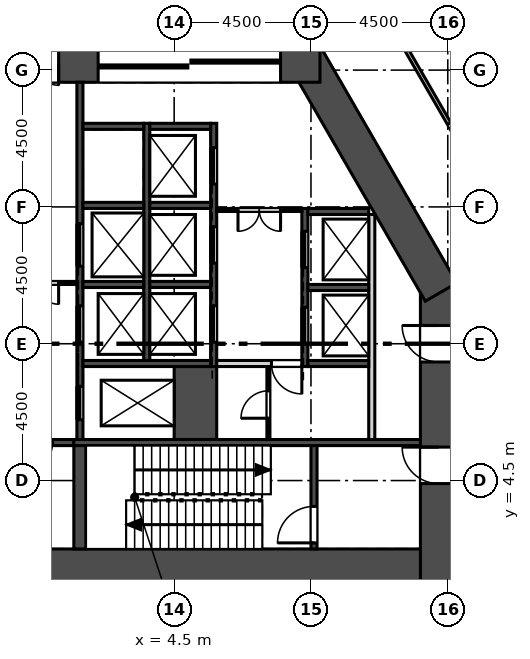
"""IFC4 building model, lengths in metres.
Left out: names, types, materials, properties, quantities, classifications, styles, units other than length and angle.
Written with IfcOpenShell. Run it as: python <this file> out.ifc"""

import sys

from ifc_helpers import new_model, si_unit, direction, frame, frame_2d, origin, place, context, subcontext, project, spatial, rectangle, extrude, element, fill, save


model = new_model("IFC4")
c1 = context("Model", 3, precision=1e-05, world=origin(), true_north=direction((0.0, 1.0)))
c2 = subcontext(c1, "Body", "Model", "MODEL_VIEW")
j1 = project(units=[si_unit("LENGTHUNIT", "METRE"), si_unit("PLANEANGLEUNIT", "RADIAN")], contexts=[c1])
p1 = place(None, origin())
s1 = spatial("IfcSite", under=j1, at=p1, CompositionType="ELEMENT")
p2 = place(p1, origin())
s2 = spatial("IfcBuilding", under=s1, at=p2, CompositionType="ELEMENT")
p3 = place(p2, frame((0.0, 0.0, 137.5)))
s3 = spatial("IfcBuildingStorey", under=s2, at=p3, CompositionType="ELEMENT", Elevation=137.5)
p4 = place(p3, frame((-13.8, 1.65, 0.0), z_axis=(0.0, 0.0, 1.0), x_axis=(1.0, 0.0, 0.0)))
e1 = element("IfcWall", 1, at=p4, inside=s3, PredefinedType="SHEAR", context=c2, shape_type="SweptSolid", body=[
    extrude(rectangle(XDim=27.6, YDim=1.2, at=frame_2d((13.8, 0.0))), origin(), (0.0, 0.0, 1.0), 5.4),
])
p5 = place(p3, frame((13.2, 1.05, 0.0), z_axis=(0.0, 0.0, 1.0), x_axis=(0.0, 1.0, 0.0)))
e2 = element("IfcWall", 2, at=p5, inside=s3, PredefinedType="SHEAR", context=c2, shape_type="SweptSolid", body=[
    extrude(rectangle(XDim=9.949, YDim=1.2, at=frame_2d((4.975, 0.0))), origin(), (0.0, 0.0, 1.0), 5.4),
])
p6 = place(p5, frame((3.35, 0.0, 0.0)))
e3 = element("IfcOpeningElement", 3, at=p6, cuts=e2, PredefinedType="OPENING", context=c2, shape_type="SweptSolid", body=[
    extrude(rectangle(XDim=1.2, YDim=2.1, at=frame_2d((0.6, 1.05))), frame((0.0, 0.61, 0.0), z_axis=(0.0, -1.0, 0.0), x_axis=(1.0, 0.0, 0.0)), (0.0, 0.0, 1.0), 1.22),
])
p7 = place(p5, frame((7.35, 0.0, 0.0)))
e4 = element("IfcOpeningElement", 4, at=p7, cuts=e2, PredefinedType="OPENING", context=c2, shape_type="SweptSolid", body=[
    extrude(rectangle(XDim=1.2, YDim=2.1, at=frame_2d((0.6, 1.05))), frame((0.0, 0.61, 0.0), z_axis=(0.0, -1.0, 0.0), x_axis=(1.0, 0.0, 0.0)), (0.0, 0.0, 1.0), 1.22),
])
p8 = place(p3, frame((13.281, 10.699, 0.0), z_axis=(0.0, 0.0, 1.0), x_axis=(-0.499998513025, 0.866026262288, 0.0)))
e5 = element("IfcWall", 5, at=p8, inside=s3, PredefinedType="SHEAR", context=c2, shape_type="SweptSolid", body=[
    extrude(rectangle(XDim=9.008, YDim=1.2, at=frame_2d((4.504, 0.0))), origin(), (0.0, 0.0, 1.0), 5.4),
])
p9 = place(p3, frame((9.296, 18.2, 0.0), z_axis=(0.0, 0.0, 1.0), x_axis=(-1.0, 0.0, 0.0)))
e6 = element("IfcWall", 6, at=p9, inside=s3, PredefinedType="SHEAR", context=c2, shape_type="SweptSolid", body=[
    extrude(rectangle(XDim=18.592, YDim=1.2, at=frame_2d((9.296, 0.0))), origin(), (0.0, 0.0, 1.0), 5.4),
])
p10 = place(p9, frame((8.596, 0.0, 0.0)))
e7 = element("IfcOpeningElement", 7, at=p10, cuts=e6, PredefinedType="OPENING", context=c2, shape_type="SweptSolid", body=[
    extrude(rectangle(XDim=1.4, YDim=2.1, at=frame_2d((0.7, 1.05))), frame((0.0, 0.61, 0.0), z_axis=(0.0, -1.0, 0.0), x_axis=(1.0, 0.0, 0.0)), (0.0, 0.0, 1.0), 1.22),
])
p11 = place(p9, frame((11.296, 0.0, 0.0)))
e8 = element("IfcOpeningElement", 8, at=p11, cuts=e6, PredefinedType="OPENING", context=c2, shape_type="SweptSolid", body=[
    extrude(rectangle(XDim=6.0, YDim=2.4, at=frame_2d((3.0, 1.2))), frame((0.0, 0.61, 0.0), z_axis=(0.0, -1.0, 0.0), x_axis=(1.0, 0.0, 0.0)), (0.0, 0.0, 1.0), 1.22),
])
p12 = place(p9, frame((1.296, 0.0, 0.0)))
e9 = element("IfcOpeningElement", 9, at=p12, cuts=e6, PredefinedType="OPENING", context=c2, shape_type="SweptSolid", body=[
    extrude(rectangle(XDim=6.0, YDim=2.4, at=frame_2d((3.0, 1.2))), frame((0.0, 0.61, 0.0), z_axis=(0.0, -1.0, 0.0), x_axis=(1.0, 0.0, 0.0)), (0.0, 0.0, 1.0), 1.22),
])
p13 = place(p3, frame((11.0, 5.85, 0.0), z_axis=(0.0, 0.0, 1.0), x_axis=(0.0, 1.0, 0.0)))
e10 = element("IfcWall", 10, at=p13, inside=s3, PredefinedType="SOLIDWALL", context=c2, shape_type="SweptSolid", body=[
    extrude(rectangle(XDim=7.4, YDim=0.2, at=frame_2d((3.7, 0.0))), origin(), (0.0, 0.0, 1.0), 5.0),
])
p14 = place(p3, frame((8.8, 8.25, -0.4), z_axis=(0.0, 0.0, 1.0), x_axis=(0.0, 1.0, 0.0)))
e11 = element("IfcWall", 11, at=p14, inside=s3, PredefinedType="SOLIDWALL", context=c2, shape_type="SweptSolid", body=[
    extrude(rectangle(XDim=5.2, YDim=0.2, at=frame_2d((2.6, 0.0))), origin(), (0.0, 0.0, 1.0), 5.4),
])
p15 = place(p14, frame((0.75, 0.0, 0.4)))
e12 = element("IfcOpeningElement", 12, at=p15, cuts=e11, PredefinedType="OPENING", context=c2, shape_type="SweptSolid", body=[
    extrude(rectangle(XDim=1.2, YDim=2.1, at=frame_2d((0.6, 1.05))), frame((0.0, 0.11, 0.0), z_axis=(0.0, -1.0, 0.0), x_axis=(1.0, 0.0, 0.0)), (0.0, 0.0, 1.0), 0.22),
])
p16 = place(p14, frame((3.25, 0.0, 0.4)))
e13 = element("IfcOpeningElement", 13, at=p16, cuts=e11, PredefinedType="OPENING", context=c2, shape_type="SweptSolid", body=[
    extrude(rectangle(XDim=1.2, YDim=2.1, at=frame_2d((0.6, 1.05))), frame((0.0, 0.11, 0.0), z_axis=(0.0, -1.0, 0.0), x_axis=(1.0, 0.0, 0.0)), (0.0, 0.0, 1.0), 0.22),
])
p17 = place(p3, frame((5.8, 8.25, -0.4), z_axis=(0.0, 0.0, 1.0), x_axis=(0.0, 1.0, 0.0)))
e14 = element("IfcWall", 14, at=p17, inside=s3, PredefinedType="SOLIDWALL", context=c2, shape_type="SweptSolid", body=[
    extrude(rectangle(XDim=8.0, YDim=0.2, at=frame_2d((4.0, 0.0))), origin(), (0.0, 0.0, 1.0), 5.4),
])
p18 = place(p17, frame((0.8, 0.0, 0.4)))
e15 = element("IfcOpeningElement", 15, at=p18, cuts=e14, PredefinedType="OPENING", context=c2, shape_type="SweptSolid", body=[
    extrude(rectangle(XDim=1.2, YDim=2.1, at=frame_2d((0.6, 1.05))), frame((0.0, 0.11, 0.0), z_axis=(0.0, -1.0, 0.0), x_axis=(1.0, 0.0, 0.0)), (0.0, 0.0, 1.0), 0.22),
])
p19 = place(p17, frame((3.4, 0.0, 0.4)))
e16 = element("IfcOpeningElement", 16, at=p19, cuts=e14, PredefinedType="OPENING", context=c2, shape_type="SweptSolid", body=[
    extrude(rectangle(XDim=1.2, YDim=2.1, at=frame_2d((0.6, 1.05))), frame((0.0, 0.11, 0.0), z_axis=(0.0, -1.0, 0.0), x_axis=(1.0, 0.0, 0.0)), (0.0, 0.0, 1.0), 0.22),
])
p20 = place(p17, frame((6.0, 0.0, 0.4)))
e17 = element("IfcOpeningElement", 17, at=p20, cuts=e14, PredefinedType="OPENING", context=c2, shape_type="SweptSolid", body=[
    extrude(rectangle(XDim=1.2, YDim=2.1, at=frame_2d((0.6, 1.05))), frame((0.0, 0.11, 0.0), z_axis=(0.0, -1.0, 0.0), x_axis=(1.0, 0.0, 0.0)), (0.0, 0.0, 1.0), 0.22),
])
p21 = place(p3, frame((3.6, 8.45, -0.4), z_axis=(0.0, 0.0, 1.0), x_axis=(0.0, 1.0, 0.0)))
e18 = element("IfcWall", 18, at=p21, inside=s3, PredefinedType="SOLIDWALL", context=c2, shape_type="SweptSolid", body=[
    extrude(rectangle(XDim=7.8, YDim=0.2, at=frame_2d((3.9, 0.0))), origin(), (0.0, 0.0, 1.0), 5.4),
])
p22 = place(p3, frame((1.4, 5.85, -0.4), z_axis=(0.0, 0.0, 1.0), x_axis=(0.0, 1.0, 0.0)))
e19 = element("IfcWall", 19, at=p22, inside=s3, PredefinedType="SOLIDWALL", context=c2, shape_type="SweptSolid", body=[
    extrude(rectangle(XDim=11.75, YDim=0.2, at=frame_2d((5.875, 0.0))), origin(), (0.0, 0.0, 1.0), 5.4),
])
p23 = place(p22, frame((3.2, 0.0, 0.4)))
e20 = element("IfcOpeningElement", 20, at=p23, cuts=e19, PredefinedType="OPENING", context=c2, shape_type="SweptSolid", body=[
    extrude(rectangle(XDim=1.2, YDim=2.1, at=frame_2d((0.6, 1.05))), frame((0.0, 0.11, 0.0), z_axis=(0.0, -1.0, 0.0), x_axis=(1.0, 0.0, 0.0)), (0.0, 0.0, 1.0), 0.22),
])
p24 = place(p22, frame((5.7, 0.0, 0.4)))
e21 = element("IfcOpeningElement", 21, at=p24, cuts=e19, PredefinedType="OPENING", context=c2, shape_type="SweptSolid", body=[
    extrude(rectangle(XDim=1.4, YDim=2.1, at=frame_2d((0.7, 1.05))), frame((0.0, 0.11, 0.0), z_axis=(0.0, -1.0, 0.0), x_axis=(1.0, 0.0, 0.0)), (0.0, 0.0, 1.0), 0.22),
])
p25 = place(p22, frame((0.65, 0.0, 0.4)))
e22 = element("IfcOpeningElement", 22, at=p25, cuts=e19, PredefinedType="OPENING", context=c2, shape_type="SweptSolid", body=[
    extrude(rectangle(XDim=1.1, YDim=2.1, at=frame_2d((0.55, 1.05))), frame((0.0, 0.11, 0.0), z_axis=(0.0, -1.0, 0.0), x_axis=(1.0, 0.0, 0.0)), (0.0, 0.0, 1.0), 0.22),
])
p26 = place(p3, frame((5.2, 5.85, -0.4), z_axis=(0.0, 0.0, 1.0), x_axis=(0.0, 1.0, 0.0)))
e23 = element("IfcWall", 23, at=p26, inside=s3, PredefinedType="SOLIDWALL", context=c2, shape_type="SweptSolid", body=[
    extrude(rectangle(XDim=2.4, YDim=1.4, at=frame_2d((1.2, 0.0))), origin(), (0.0, 0.0, 1.0), 5.4),
])
p27 = place(p3, frame((8.9, 8.35, -0.4), z_axis=(0.0, 0.0, 1.0), x_axis=(1.0, 0.0, 0.0)))
e24 = element("IfcWall", 24, at=p27, inside=s3, PredefinedType="SOLIDWALL", context=c2, shape_type="SweptSolid", body=[
    extrude(rectangle(XDim=2.0, YDim=0.2, at=frame_2d((1.0, 0.0))), origin(), (0.0, 0.0, 1.0), 5.4),
])
p28 = place(p3, frame((1.5, 8.35, -0.4), z_axis=(0.0, 0.0, 1.0), x_axis=(1.0, 0.0, 0.0)))
e25 = element("IfcWall", 25, at=p28, inside=s3, PredefinedType="SOLIDWALL", context=c2, shape_type="SweptSolid", body=[
    extrude(rectangle(XDim=4.2, YDim=0.2, at=frame_2d((2.1, 0.0))), origin(), (0.0, 0.0, 1.0), 5.4),
])
p29 = place(p3, frame((-1.2, 5.75, -0.4), z_axis=(0.0, 0.0, 1.0), x_axis=(1.0, 0.0, 0.0)))
e26 = element("IfcWall", 26, at=p29, inside=s3, PredefinedType="SOLIDWALL", context=c2, shape_type="SweptSolid", body=[
    extrude(rectangle(XDim=2.4, YDim=0.2, at=frame_2d((1.2, 0.0))), origin(), (0.0, 0.0, 1.0), 5.4),
])
p30 = place(p29, frame((0.7, 0.0, 0.4)))
e27 = element("IfcOpeningElement", 27, at=p30, cuts=e26, PredefinedType="OPENING", context=c2, shape_type="SweptSolid", body=[
    extrude(rectangle(XDim=1.0, YDim=2.1, at=frame_2d((0.5, 1.05))), frame((0.0, 0.11, 0.0), z_axis=(0.0, -1.0, 0.0), x_axis=(1.0, 0.0, 0.0)), (0.0, 0.0, 1.0), 0.22),
])
p31 = place(p3, frame((1.2, 5.75, -0.4), z_axis=(0.0, 0.0, 1.0), x_axis=(1.0, 0.0, 0.0)))
e28 = element("IfcWall", 28, at=p31, inside=s3, PredefinedType="SOLIDWALL", context=c2, shape_type="SweptSolid", body=[
    extrude(rectangle(XDim=11.4, YDim=0.2, at=frame_2d((5.7, 0.0))), origin(), (0.0, 0.0, 1.0), 5.4),
])
p32 = place(p3, frame((9.1, 2.25, -0.4), z_axis=(0.0, 0.0, 1.0), x_axis=(0.0, 1.0, 0.0)))
e29 = element("IfcWall", 29, at=p32, inside=s3, PredefinedType="SOLIDWALL", context=c2, shape_type="SweptSolid", body=[
    extrude(rectangle(XDim=3.4, YDim=0.2, at=frame_2d((1.7, 0.0))), origin(), (0.0, 0.0, 1.0), 5.4),
])
p33 = place(p32, frame((0.2, 0.0, 0.4)))
e30 = element("IfcOpeningElement", 30, at=p33, cuts=e29, PredefinedType="OPENING", context=c2, shape_type="SweptSolid", body=[
    extrude(rectangle(XDim=1.2, YDim=2.1, at=frame_2d((0.6, 1.05))), frame((0.0, 0.11, 0.0), z_axis=(0.0, -1.0, 0.0), x_axis=(1.0, 0.0, 0.0)), (0.0, 0.0, 1.0), 0.22),
])
p34 = place(p3, frame((1.4, 2.25, -0.4), z_axis=(0.0, 0.0, 1.0), x_axis=(0.0, 1.0, 0.0)))
e31 = element("IfcWall", 31, at=p34, inside=s3, PredefinedType="SOLIDWALL", context=c2, shape_type="SweptSolid", body=[
    extrude(rectangle(XDim=3.4, YDim=0.4, at=frame_2d((1.7, 0.0))), origin(), (0.0, 0.0, 1.0), 5.4),
])
for number, where, z_axis, x_axis in (
    (32, (8.9, 10.85, -0.4), (0.0, 0.0, 1.0), (1.0, 0.0, 0.0)),
    (33, (8.9, 13.35, -0.4), (0.0, 0.0, 1.0), (1.0, 0.0, 0.0)),
    (34, (3.7, 10.95, -0.4), (0.0, 0.0, 1.0), (1.0, 0.0, 0.0)),
    (35, (3.7, 13.55, -0.4), (0.0, 0.0, 1.0), (1.0, 0.0, 0.0)),
    (36, (3.7, 16.15, -0.4), (0.0, 0.0, 1.0), (1.0, 0.0, 0.0)),
    (37, (1.5, 10.95, -0.4), (0.0, 0.0, 1.0), (1.0, 0.0, 0.0)),
    (38, (1.5, 13.55, -0.4), (0.0, 0.0, 1.0), (1.0, 0.0, 0.0)),
    (39, (1.5, 16.15, -0.4), (0.0, 0.0, 1.0), (1.0, 0.0, 0.0)),
):
    element("IfcWall", number, at=place(p3, frame(where, z_axis=z_axis, x_axis=x_axis)), inside=s3, PredefinedType="SOLIDWALL", context=c2, shape_type="SweptSolid", body=[
        extrude(rectangle(XDim=2.0, YDim=0.2, at=frame_2d((1.0, 0.0))), origin(), (0.0, 0.0, 1.0), 5.4),
    ])
p35 = place(p3, frame((5.9, 13.4, 0.0), z_axis=(0.0, 0.0, 1.0), x_axis=(1.0, 0.0, 0.0)))
e40 = element("IfcWall", 40, at=p35, inside=s3, PredefinedType="PARTITIONING", context=c2, shape_type="SweptSolid", body=[
    extrude(rectangle(XDim=2.8, YDim=0.1, at=frame_2d((1.4, 0.0))), origin(), (0.0, 0.0, 1.0), 5.0),
])
p36 = place(p35, frame((0.7, 0.0, 0.0)))
e41 = element("IfcOpeningElement", 41, at=p36, cuts=e40, PredefinedType="OPENING", context=c2, shape_type="SweptSolid", body=[
    extrude(rectangle(XDim=1.4, YDim=2.1, at=frame_2d((0.7, 1.05))), frame((0.0, 0.06, 0.0), z_axis=(0.0, -1.0, 0.0), x_axis=(1.0, 0.0, 0.0)), (0.0, 0.0, 1.0), 0.12),
])
p37 = place(p3, frame((7.6, 5.85, 0.0), z_axis=(0.0, 0.0, 1.0), x_axis=(0.0, 1.0, 0.0)))
e42 = element("IfcWall", 42, at=p37, inside=s3, PredefinedType="PARTITIONING", context=c2, shape_type="SweptSolid", body=[
    extrude(rectangle(XDim=2.4, YDim=0.1, at=frame_2d((1.2, 0.0))), origin(), (0.0, 0.0, 1.0), 5.0),
])
p38 = place(p37, frame((0.7, 0.0, 0.0)))
e43 = element("IfcOpeningElement", 43, at=p38, cuts=e42, PredefinedType="OPENING", context=c2, shape_type="SweptSolid", body=[
    extrude(rectangle(XDim=0.9, YDim=2.1, at=frame_2d((0.45, 1.05))), frame((0.0, 0.06, 0.0), z_axis=(0.0, -1.0, 0.0), x_axis=(1.0, 0.0, 0.0)), (0.0, 0.0, 1.0), 0.12),
])
p39 = place(p3, frame((5.9, 8.35, 0.0), z_axis=(0.0, 0.0, 1.0), x_axis=(1.0, 0.0, 0.0)))
e44 = element("IfcWall", 44, at=p39, inside=s3, PredefinedType="SOLIDWALL", context=c2, shape_type="SweptSolid", body=[
    extrude(rectangle(XDim=2.8, YDim=0.2, at=frame_2d((1.4, 0.0))), origin(), (0.0, 0.0, 1.0), 5.0),
])
p40 = place(p39, frame((1.8, 0.0, 0.0)))
e45 = element("IfcOpeningElement", 45, at=p40, cuts=e44, PredefinedType="OPENING", context=c2, shape_type="SweptSolid", body=[
    extrude(rectangle(XDim=1.0, YDim=2.1, at=frame_2d((0.5, 1.05))), frame((0.0, 0.11, 0.0), z_axis=(0.0, -1.0, 0.0), x_axis=(1.0, 0.0, 0.0)), (0.0, 0.0, 1.0), 0.22),
])
p41 = place(p3, frame((-1.3, 11.0, 0.0), z_axis=(0.0, 0.0, 1.0), x_axis=(1.0, 0.0, 0.0)))
e46 = element("IfcWall", 46, at=p41, inside=s3, PredefinedType="PARTITIONING", context=c2, shape_type="SweptSolid", body=[
    extrude(rectangle(XDim=2.6, YDim=0.1, at=frame_2d((1.3, 0.0))), origin(), (0.0, 0.0, 1.0), 5.0),
])
p42 = place(p41, frame((0.6, 0.0, 0.0)))
e47 = element("IfcOpeningElement", 47, at=p42, cuts=e46, PredefinedType="OPENING", context=c2, shape_type="SweptSolid", body=[
    extrude(rectangle(XDim=1.4, YDim=2.1, at=frame_2d((0.7, 1.05))), frame((0.0, 0.06, 0.0), z_axis=(0.0, -1.0, 0.0), x_axis=(1.0, 0.0, 0.0)), (0.0, 0.0, 1.0), 0.12),
])
p43 = place(p3, frame((12.122, 18.706, 0.0), z_axis=(0.0, 0.0, 1.0), x_axis=(0.499989655977, -0.866031375826, 0.0)))
e48 = element("IfcWall", 48, at=p43, inside=s3, PredefinedType="PARTITIONING", context=c2, shape_type="SweptSolid", body=[
    extrude(rectangle(XDim=6.697, YDim=0.125, at=frame_2d((3.348, 0.0))), origin(), (0.0, 0.0, 1.0), 5.0),
])
p44 = place(p43, frame((2.848, 0.0, 0.0)))
e49 = element("IfcOpeningElement", 49, at=p44, cuts=e48, PredefinedType="OPENING", context=c2, shape_type="SweptSolid", body=[
    extrude(rectangle(XDim=1.0, YDim=2.1, at=frame_2d((0.5, 1.05))), frame((0.0, 0.073, 0.0), z_axis=(0.0, -1.0, 0.0), x_axis=(1.0, 0.0, 0.0)), (0.0, 0.0, 1.0), 0.145),
])
p45 = place(p15, origin())
e50 = element("IfcDoor", 50, at=p45, inside=s3, OperationType="SLIDING_TO_LEFT", PredefinedType="DOOR", context=c2, shape_type="SweptSolid", body=[
    extrude(rectangle(XDim=1.2, YDim=2.1, at=frame_2d((0.6, 1.05))), frame((0.0, 0.025, 0.0), z_axis=(0.0, -1.0, 0.0), x_axis=(1.0, 0.0, 0.0)), (0.0, 0.0, 1.0), 0.05),
])
fill(e12, e50)
p46 = place(p16, origin())
e51 = element("IfcDoor", 51, at=p46, inside=s3, OperationType="SLIDING_TO_LEFT", PredefinedType="DOOR", context=c2, shape_type="SweptSolid", body=[
    extrude(rectangle(XDim=1.2, YDim=2.1, at=frame_2d((0.6, 1.05))), frame((0.0, 0.025, 0.0), z_axis=(0.0, -1.0, 0.0), x_axis=(1.0, 0.0, 0.0)), (0.0, 0.0, 1.0), 0.05),
])
fill(e13, e51)
p47 = place(p18, origin())
e52 = element("IfcDoor", 52, at=p47, inside=s3, OperationType="SLIDING_TO_LEFT", PredefinedType="DOOR", context=c2, shape_type="SweptSolid", body=[
    extrude(rectangle(XDim=1.2, YDim=2.1, at=frame_2d((0.6, 1.05))), frame((0.0, 0.025, 0.0), z_axis=(0.0, -1.0, 0.0), x_axis=(1.0, 0.0, 0.0)), (0.0, 0.0, 1.0), 0.05),
])
fill(e15, e52)
p48 = place(p19, origin())
e53 = element("IfcDoor", 53, at=p48, inside=s3, OperationType="SLIDING_TO_LEFT", PredefinedType="DOOR", context=c2, shape_type="SweptSolid", body=[
    extrude(rectangle(XDim=1.2, YDim=2.1, at=frame_2d((0.6, 1.05))), frame((0.0, 0.025, 0.0), z_axis=(0.0, -1.0, 0.0), x_axis=(1.0, 0.0, 0.0)), (0.0, 0.0, 1.0), 0.05),
])
fill(e16, e53)
p49 = place(p20, origin())
e54 = element("IfcDoor", 54, at=p49, inside=s3, OperationType="SLIDING_TO_LEFT", PredefinedType="DOOR", context=c2, shape_type="SweptSolid", body=[
    extrude(rectangle(XDim=1.2, YDim=2.1, at=frame_2d((0.6, 1.05))), frame((0.0, 0.025, 0.0), z_axis=(0.0, -1.0, 0.0), x_axis=(1.0, 0.0, 0.0)), (0.0, 0.0, 1.0), 0.05),
])
fill(e17, e54)
p50 = place(p23, origin())
e55 = element("IfcDoor", 55, at=p50, inside=s3, OperationType="SLIDING_TO_LEFT", PredefinedType="DOOR", context=c2, shape_type="SweptSolid", body=[
    extrude(rectangle(XDim=1.2, YDim=2.1, at=frame_2d((0.6, 1.05))), frame((0.0, 0.025, 0.0), z_axis=(0.0, -1.0, 0.0), x_axis=(1.0, 0.0, 0.0)), (0.0, 0.0, 1.0), 0.05),
])
fill(e20, e55)
p51 = place(p24, origin())
e56 = element("IfcDoor", 56, at=p51, inside=s3, OperationType="SLIDING_TO_LEFT", PredefinedType="DOOR", context=c2, shape_type="SweptSolid", body=[
    extrude(rectangle(XDim=1.4, YDim=2.1, at=frame_2d((0.7, 1.05))), frame((0.0, 0.025, 0.0), z_axis=(0.0, -1.0, 0.0), x_axis=(1.0, 0.0, 0.0)), (0.0, 0.0, 1.0), 0.05),
])
fill(e21, e56)
p52 = place(p25, origin())
e57 = element("IfcDoor", 57, at=p52, inside=s3, OperationType="SLIDING_TO_RIGHT", PredefinedType="DOOR", context=c2, shape_type="SweptSolid", body=[
    extrude(rectangle(XDim=1.1, YDim=2.1, at=frame_2d((0.55, 1.05))), frame((0.0, 0.025, 0.0), z_axis=(0.0, -1.0, 0.0), x_axis=(1.0, 0.0, 0.0)), (0.0, 0.0, 1.0), 0.05),
])
fill(e22, e57)
p53 = place(p36, frame((1.4, 0.0, 0.0), z_axis=(0.0, 0.0, 1.0), x_axis=(-1.0, 0.0, 0.0)))
e58 = element("IfcDoor", 58, at=p53, inside=s3, OperationType="DOUBLE_DOOR_SINGLE_SWING", PredefinedType="DOOR", context=c2, shape_type="SweptSolid", body=[
    extrude(rectangle(XDim=1.4, YDim=2.1, at=frame_2d((0.7, 1.05))), frame((0.0, 0.025, 0.0), z_axis=(0.0, -1.0, 0.0), x_axis=(1.0, 0.0, 0.0)), (0.0, 0.0, 1.0), 0.05),
])
fill(e41, e58)
p54 = place(p40, frame((1.0, 0.0, 0.0), z_axis=(0.0, 0.0, 1.0), x_axis=(-1.0, 0.0, 0.0)))
e59 = element("IfcDoor", 59, at=p54, inside=s3, OperationType="SINGLE_SWING_LEFT", PredefinedType="DOOR", context=c2, shape_type="SweptSolid", body=[
    extrude(rectangle(XDim=1.0, YDim=2.1, at=frame_2d((0.5, 1.05))), frame((0.0, 0.025, 0.0), z_axis=(0.0, -1.0, 0.0), x_axis=(1.0, 0.0, 0.0)), (0.0, 0.0, 1.0), 0.05),
])
fill(e45, e59)
p55 = place(p38, origin())
e60 = element("IfcDoor", 60, at=p55, inside=s3, OperationType="SINGLE_SWING_LEFT", PredefinedType="DOOR", context=c2, shape_type="SweptSolid", body=[
    extrude(rectangle(XDim=0.9, YDim=2.1, at=frame_2d((0.45, 1.05))), frame((0.0, 0.025, 0.0), z_axis=(0.0, -1.0, 0.0), x_axis=(1.0, 0.0, 0.0)), (0.0, 0.0, 1.0), 0.05),
])
fill(e43, e60)
p56 = place(p6, origin())
e61 = element("IfcDoor", 61, at=p56, inside=s3, OperationType="SINGLE_SWING_RIGHT", PredefinedType="DOOR", context=c2, shape_type="SweptSolid", body=[
    extrude(rectangle(XDim=1.2, YDim=2.1, at=frame_2d((0.6, 1.05))), frame((0.0, 0.025, 0.0), z_axis=(0.0, -1.0, 0.0), x_axis=(1.0, 0.0, 0.0)), (0.0, 0.0, 1.0), 0.05),
])
fill(e3, e61)
p57 = place(p33, origin())
e62 = element("IfcDoor", 62, at=p57, inside=s3, OperationType="SINGLE_SWING_LEFT", PredefinedType="DOOR", context=c2, shape_type="SweptSolid", body=[
    extrude(rectangle(XDim=1.2, YDim=2.1, at=frame_2d((0.6, 1.05))), frame((0.0, 0.025, 0.0), z_axis=(0.0, -1.0, 0.0), x_axis=(1.0, 0.0, 0.0)), (0.0, 0.0, 1.0), 0.05),
])
fill(e30, e62)
p58 = place(p7, origin())
e63 = element("IfcDoor", 63, at=p58, inside=s3, OperationType="SINGLE_SWING_RIGHT", PredefinedType="DOOR", context=c2, shape_type="SweptSolid", body=[
    extrude(rectangle(XDim=1.2, YDim=2.1, at=frame_2d((0.6, 1.05))), frame((0.0, 0.025, 0.0), z_axis=(0.0, -1.0, 0.0), x_axis=(1.0, 0.0, 0.0)), (0.0, 0.0, 1.0), 0.05),
])
fill(e4, e63)
p59 = place(p42, frame((1.4, 0.0, 0.0), z_axis=(0.0, 0.0, 1.0), x_axis=(-1.0, 0.0, 0.0)))
e64 = element("IfcDoor", 64, at=p59, inside=s3, OperationType="DOUBLE_DOOR_SINGLE_SWING", PredefinedType="DOOR", context=c2, shape_type="SweptSolid", body=[
    extrude(rectangle(XDim=1.4, YDim=2.1, at=frame_2d((0.7, 1.05))), frame((0.0, 0.025, 0.0), z_axis=(0.0, -1.0, 0.0), x_axis=(1.0, 0.0, 0.0)), (0.0, 0.0, 1.0), 0.05),
])
fill(e47, e64)
p60 = place(p10, origin())
e65 = element("IfcDoor", 65, at=p60, inside=s3, OperationType="DOUBLE_DOOR_SINGLE_SWING", PredefinedType="DOOR", context=c2, shape_type="SweptSolid", body=[
    extrude(rectangle(XDim=1.4, YDim=2.1, at=frame_2d((0.7, 1.05))), frame((0.0, 0.025, 0.0), z_axis=(0.0, -1.0, 0.0), x_axis=(1.0, 0.0, 0.0)), (0.0, 0.0, 1.0), 0.05),
])
fill(e7, e65)
p61 = place(p12, origin())
e66 = element("IfcDoor", 66, at=p61, inside=s3, OperationType="DOUBLE_DOOR_SLIDING", PredefinedType="DOOR", context=c2, shape_type="SweptSolid", body=[
    extrude(rectangle(XDim=6.0, YDim=2.4, at=frame_2d((3.0, 1.2))), frame((0.0, 0.025, 0.0), z_axis=(0.0, -1.0, 0.0), x_axis=(1.0, 0.0, 0.0)), (0.0, 0.0, 1.0), 0.05),
])
fill(e9, e66)
p62 = place(p44, origin())
e67 = element("IfcDoor", 67, at=p62, inside=s3, OperationType="SINGLE_SWING_LEFT", PredefinedType="DOOR", context=c2, shape_type="SweptSolid", body=[
    extrude(rectangle(XDim=1.0, YDim=2.1, at=frame_2d((0.5, 1.05))), frame((0.0, 0.025, 0.0), z_axis=(0.0, -1.0, 0.0), x_axis=(1.0, 0.0, 0.0)), (0.0, 0.0, 1.0), 0.05),
])
fill(e49, e67)
save(model, sys.argv[1])
